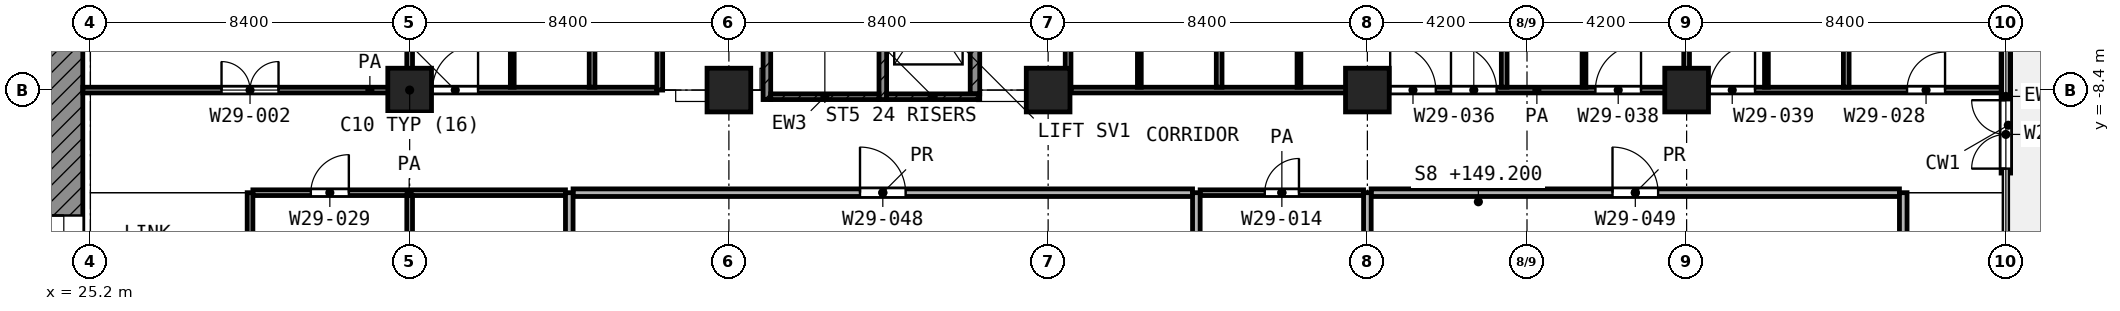
"""IFC4 building model, lengths in metres.
Left out: names, types, materials, properties, quantities, classifications, styles, units other than length and angle.
Written with IfcOpenShell. Run it as: python <this file> out.ifc"""

import sys

from ifc_helpers import new_model, si_unit, direction, frame, frame_2d, origin, origin_2d, place, context, subcontext, project, spatial, rectangle, extrude, element, fill, save


model = new_model("IFC4")
c1 = context("Model", 3, precision=1e-05, world=origin(), true_north=direction((0.0, 1.0)))
c2 = subcontext(c1, "Body", "Model", "MODEL_VIEW")
j1 = project(units=[si_unit("LENGTHUNIT", "METRE"), si_unit("PLANEANGLEUNIT", "RADIAN")], contexts=[c1])
p1 = place(None, origin())
s1 = spatial("IfcSite", under=j1, at=p1, CompositionType="ELEMENT")
p2 = place(p1, origin())
s2 = spatial("IfcBuilding", under=s1, at=p2, CompositionType="ELEMENT")
p3 = place(p2, frame((0.0, 0.0, 149.2)))
s3 = spatial("IfcBuildingStorey", under=s2, at=p3, CompositionType="ELEMENT", Elevation=149.2)
for number, where, z_axis, x_axis in (
    (1, (33.6, -8.4, 0.0), (0.0, 0.0, 1.0), (1.0, 0.0, 0.0)),
    (2, (42.0, -8.4, 0.0), (0.0, 0.0, 1.0), (1.0, 0.0, 0.0)),
    (3, (50.4, -8.4, 0.0), (0.0, 0.0, 1.0), (1.0, 0.0, 0.0)),
    (4, (58.8, -8.4, 0.0), (0.0, 0.0, 1.0), (1.0, 0.0, 0.0)),
    (5, (67.2, -8.4, 0.0), (0.0, 0.0, 1.0), (1.0, 0.0, 0.0)),
):
    element("IfcColumn", number, at=place(p3, frame(where, z_axis=z_axis, x_axis=x_axis)), inside=s3, PredefinedType="COLUMN", context=c2, shape_type="SweptSolid", body=[
        extrude(rectangle(XDim=1.15, YDim=1.15, at=origin_2d()), origin(), (0.0, 0.0, 1.0), 4.2),
    ])
p4 = place(p3, frame((75.6, -10.583, 0.0), z_axis=(0.0, 0.0, 1.0), x_axis=(0.0, 1.0, 0.0)))
e6 = element("IfcWall", 6, at=p4, inside=s3, PredefinedType="SOLIDWALL", context=c2, shape_type="SweptSolid", body=[
    extrude(rectangle(XDim=4.033, YDim=0.25, at=frame_2d((2.017, 0.0))), origin(), (0.0, 0.0, 1.0), 3.58),
])
p5 = place(p4, frame((0.117, 0.0, 0.0)))
e7 = element("IfcOpeningElement", 7, at=p5, cuts=e6, PredefinedType="OPENING", context=c2, shape_type="SweptSolid", body=[
    extrude(rectangle(XDim=1.8, YDim=2.1, at=frame_2d((0.9, 1.05))), frame((0.0, 0.135, 0.0), z_axis=(0.0, -1.0, 0.0), x_axis=(1.0, 0.0, 0.0)), (0.0, 0.0, 1.0), 0.27),
])
p6 = place(p3, frame((24.5, -24.0, 0.0), z_axis=(0.0, 0.0, 1.0), x_axis=(0.0, 1.0, 0.0)))
e8 = element("IfcWall", 8, at=p6, inside=s3, PredefinedType="SHEAR", context=c2, shape_type="SweptSolid", body=[
    extrude(rectangle(XDim=18.6, YDim=1.0, at=frame_2d((9.3, 0.0))), origin(), (0.0, 0.0, 1.0), 3.7),
])
p7 = place(p6, frame((10.5, 0.0, 0.0)))
e9 = element("IfcOpeningElement", 9, at=p7, cuts=e8, PredefinedType="OPENING", context=c2, shape_type="SweptSolid", body=[
    extrude(rectangle(XDim=1.8, YDim=2.1, at=frame_2d((0.9, 1.05))), frame((0.0, 0.51, 0.0), z_axis=(0.0, -1.0, 0.0), x_axis=(1.0, 0.0, 0.0)), (0.0, 0.0, 1.0), 1.02),
])
p8 = place(p3, frame((43.0, -8.65, 0.0), z_axis=(0.0, 0.0, 1.0), x_axis=(0.0, 1.0, 0.0)))
e10 = element("IfcWall", 10, at=p8, inside=s3, PredefinedType="SHEAR", context=c2, shape_type="SweptSolid", body=[
    extrude(rectangle(XDim=8.35, YDim=0.2, at=frame_2d((4.175, 0.0))), origin(), (0.0, 0.0, 1.0), 3.7),
])
p9 = place(p8, frame((7.0, 0.0, 0.0)))
e11 = element("IfcOpeningElement", 11, at=p9, cuts=e10, PredefinedType="OPENING", context=c2, shape_type="SweptSolid", body=[
    extrude(rectangle(XDim=1.1, YDim=2.1, at=frame_2d((0.55, 1.05))), frame((0.0, 0.11, 0.0), z_axis=(0.0, -1.0, 0.0), x_axis=(1.0, 0.0, 0.0)), (0.0, 0.0, 1.0), 0.22),
])
p10 = place(p3, frame((46.05, -8.65, 0.0), z_axis=(0.0, 0.0, 1.0), x_axis=(0.0, 1.0, 0.0)))
e12 = element("IfcWall", 12, at=p10, inside=s3, PredefinedType="SHEAR", context=c2, shape_type="SweptSolid", body=[
    extrude(rectangle(XDim=8.35, YDim=0.2, at=frame_2d((4.175, 0.0))), origin(), (0.0, 0.0, 1.0), 3.7),
])
p11 = place(p10, frame((7.0, 0.0, 0.0)))
e13 = element("IfcOpeningElement", 13, at=p11, cuts=e12, PredefinedType="OPENING", context=c2, shape_type="SweptSolid", body=[
    extrude(rectangle(XDim=1.1, YDim=2.1, at=frame_2d((0.55, 1.05))), frame((0.0, 0.11, 0.0), z_axis=(0.0, -1.0, 0.0), x_axis=(1.0, 0.0, 0.0)), (0.0, 0.0, 1.0), 0.22),
])
p12 = place(p3, frame((43.1, -8.575, 0.0), z_axis=(0.0, 0.0, 1.0), x_axis=(1.0, 0.0, 0.0)))
e14 = element("IfcWall", 14, at=p12, inside=s3, PredefinedType="SHEAR", context=c2, shape_type="SweptSolid", body=[
    extrude(rectangle(XDim=2.85, YDim=0.15, at=frame_2d((1.425, 0.0))), origin(), (0.0, 0.0, 1.0), 3.7),
])
p13 = place(p3, frame((46.15, -8.575, 0.0), z_axis=(0.0, 0.0, 1.0), x_axis=(1.0, 0.0, 0.0)))
e15 = element("IfcWall", 15, at=p13, inside=s3, PredefinedType="SHEAR", context=c2, shape_type="SweptSolid", body=[
    extrude(rectangle(XDim=2.45, YDim=0.15, at=frame_2d((1.225, 0.0))), origin(), (0.0, 0.0, 1.0), 3.7),
])
p14 = place(p3, frame((48.475, -8.5, 0.0), z_axis=(0.0, 0.0, 1.0), x_axis=(0.0, 1.0, 0.0)))
e16 = element("IfcWall", 16, at=p14, inside=s3, PredefinedType="SHEAR", context=c2, shape_type="SweptSolid", body=[
    extrude(rectangle(XDim=3.475, YDim=0.25, at=frame_2d((1.738, 0.0))), origin(), (0.0, 0.0, 1.0), 3.7),
])
p15 = place(p3, frame((36.3, -8.325, 0.0), z_axis=(0.0, 0.0, 1.0), x_axis=(0.0, 1.0, 0.0)))
e17 = element("IfcWall", 17, at=p15, inside=s3, PredefinedType="PARTITIONING", context=c2, shape_type="SweptSolid", body=[
    extrude(rectangle(XDim=2.624, YDim=0.1, at=frame_2d((1.312, 0.0))), origin(), (0.0, 0.0, 1.0), 3.7),
])
p16 = place(p3, frame((52.8, -8.325, 0.0), z_axis=(0.0, 0.0, 1.0), x_axis=(0.0, 1.0, 0.0)))
e18 = element("IfcWall", 18, at=p16, inside=s3, PredefinedType="PARTITIONING", context=c2, shape_type="SweptSolid", body=[
    extrude(rectangle(XDim=2.625, YDim=0.1, at=frame_2d((1.312, 0.0))), origin(), (0.0, 0.0, 1.0), 3.7),
])
p17 = place(p3, frame((57.0, -8.325, 0.0), z_axis=(0.0, 0.0, 1.0), x_axis=(0.0, 1.0, 0.0)))
e19 = element("IfcWall", 19, at=p17, inside=s3, PredefinedType="PARTITIONING", context=c2, shape_type="SweptSolid", body=[
    extrude(rectangle(XDim=2.624, YDim=0.1, at=frame_2d((1.312, 0.0))), origin(), (0.0, 0.0, 1.0), 3.7),
])
p18 = place(p3, frame((64.5, -8.325, 0.0), z_axis=(0.0, 0.0, 1.0), x_axis=(0.0, 1.0, 0.0)))
e20 = element("IfcWall", 20, at=p18, inside=s3, PredefinedType="PARTITIONING", context=c2, shape_type="SweptSolid", body=[
    extrude(rectangle(XDim=2.625, YDim=0.1, at=frame_2d((1.312, 0.0))), origin(), (0.0, 0.0, 1.0), 3.7),
])
p19 = place(p3, frame((69.3, -8.325, 0.0), z_axis=(0.0, 0.0, 1.0), x_axis=(0.0, 1.0, 0.0)))
e21 = element("IfcWall", 21, at=p19, inside=s3, PredefinedType="PARTITIONING", context=c2, shape_type="SweptSolid", body=[
    extrude(rectangle(XDim=2.624, YDim=0.1, at=frame_2d((1.312, 0.0))), origin(), (0.0, 0.0, 1.0), 3.7),
])
p20 = place(p3, frame((29.475, -11.1, 0.0), z_axis=(0.0, 0.0, 1.0), x_axis=(1.0, 0.0, 0.0)))
e22 = element("IfcWall", 22, at=p20, inside=s3, PredefinedType="PARTITIONING", context=c2, shape_type="SweptSolid", body=[
    extrude(rectangle(XDim=8.225, YDim=0.15, at=frame_2d((4.112, 0.0))), origin(), (0.0, 0.0, 1.0), 3.7),
])
p21 = place(p20, frame((1.525, 0.0, 0.0)))
e23 = element("IfcOpeningElement", 23, at=p21, cuts=e22, PredefinedType="OPENING", context=c2, shape_type="SweptSolid", body=[
    extrude(rectangle(XDim=1.0, YDim=2.1, at=frame_2d((0.5, 1.05))), frame((0.0, 0.085, 0.0), z_axis=(0.0, -1.0, 0.0), x_axis=(1.0, 0.0, 0.0)), (0.0, 0.0, 1.0), 0.17),
])
p22 = place(p3, frame((54.4, -11.1, 0.0), z_axis=(0.0, 0.0, 1.0), x_axis=(1.0, 0.0, 0.0)))
e24 = element("IfcWall", 24, at=p22, inside=s3, PredefinedType="PARTITIONING", context=c2, shape_type="SweptSolid", body=[
    extrude(rectangle(XDim=4.3, YDim=0.15, at=frame_2d((2.15, 0.0))), origin(), (0.0, 0.0, 1.0), 3.7),
])
p23 = place(p22, frame((1.7, 0.0, 0.0)))
e25 = element("IfcOpeningElement", 25, at=p23, cuts=e24, PredefinedType="OPENING", context=c2, shape_type="SweptSolid", body=[
    extrude(rectangle(XDim=0.9, YDim=2.1, at=frame_2d((0.45, 1.05))), frame((0.0, 0.085, 0.0), z_axis=(0.0, -1.0, 0.0), x_axis=(1.0, 0.0, 0.0)), (0.0, 0.0, 1.0), 0.17),
])
p24 = place(p3, frame((25.0, -8.4, 0.0), z_axis=(0.0, 0.0, 1.0), x_axis=(1.0, 0.0, 0.0)))
e26 = element("IfcWall", 26, at=p24, inside=s3, PredefinedType="PARTITIONING", context=c2, shape_type="SweptSolid", body=[
    extrude(rectangle(XDim=15.107, YDim=0.15, at=frame_2d((7.553, 0.0))), origin(), (0.0, 0.0, 1.0), 3.7),
])
p25 = place(p24, frame((3.65, 0.0, 0.0)))
e27 = element("IfcOpeningElement", 27, at=p25, cuts=e26, PredefinedType="OPENING", context=c2, shape_type="SweptSolid", body=[
    extrude(rectangle(XDim=1.5, YDim=2.1, at=frame_2d((0.75, 1.05))), frame((0.0, 0.085, 0.0), z_axis=(0.0, -1.0, 0.0), x_axis=(1.0, 0.0, 0.0)), (0.0, 0.0, 1.0), 0.17),
])
p26 = place(p24, frame((9.2, 0.0, 0.0)))
e28 = element("IfcOpeningElement", 28, at=p26, cuts=e26, PredefinedType="OPENING", context=c2, shape_type="SweptSolid", body=[
    extrude(rectangle(XDim=1.2, YDim=2.1, at=frame_2d((0.6, 1.05))), frame((0.0, 0.085, 0.0), z_axis=(0.0, -1.0, 0.0), x_axis=(1.0, 0.0, 0.0)), (0.0, 0.0, 1.0), 0.17),
])
p27 = place(p3, frame((51.0, -8.4, 0.0), z_axis=(0.0, 0.0, 1.0), x_axis=(1.0, 0.0, 0.0)))
e29 = element("IfcWall", 29, at=p27, inside=s3, PredefinedType="PARTITIONING", context=c2, shape_type="SweptSolid", body=[
    extrude(rectangle(XDim=24.52, YDim=0.15, at=frame_2d((12.26, 0.0))), origin(), (0.0, 0.0, 1.0), 3.7),
])
p28 = place(p27, frame((8.4, 0.0, 0.0)))
e30 = element("IfcOpeningElement", 30, at=p28, cuts=e29, PredefinedType="OPENING", context=c2, shape_type="SweptSolid", body=[
    extrude(rectangle(XDim=1.2, YDim=2.1, at=frame_2d((0.6, 1.05))), frame((0.0, 0.085, 0.0), z_axis=(0.0, -1.0, 0.0), x_axis=(1.0, 0.0, 0.0)), (0.0, 0.0, 1.0), 0.17),
])
p29 = place(p27, frame((10.0, 0.0, 0.0)))
e31 = element("IfcOpeningElement", 31, at=p29, cuts=e29, PredefinedType="OPENING", context=c2, shape_type="SweptSolid", body=[
    extrude(rectangle(XDim=1.2, YDim=2.1, at=frame_2d((0.6, 1.05))), frame((0.0, 0.085, 0.0), z_axis=(0.0, -1.0, 0.0), x_axis=(1.0, 0.0, 0.0)), (0.0, 0.0, 1.0), 0.17),
])
p30 = place(p27, frame((13.8, 0.0, 0.0)))
e32 = element("IfcOpeningElement", 32, at=p30, cuts=e29, PredefinedType="OPENING", context=c2, shape_type="SweptSolid", body=[
    extrude(rectangle(XDim=1.2, YDim=2.1, at=frame_2d((0.6, 1.05))), frame((0.0, 0.085, 0.0), z_axis=(0.0, -1.0, 0.0), x_axis=(1.0, 0.0, 0.0)), (0.0, 0.0, 1.0), 0.17),
])
p31 = place(p27, frame((16.8, 0.0, 0.0)))
e33 = element("IfcOpeningElement", 33, at=p31, cuts=e29, PredefinedType="OPENING", context=c2, shape_type="SweptSolid", body=[
    extrude(rectangle(XDim=1.2, YDim=2.1, at=frame_2d((0.6, 1.05))), frame((0.0, 0.085, 0.0), z_axis=(0.0, -1.0, 0.0), x_axis=(1.0, 0.0, 0.0)), (0.0, 0.0, 1.0), 0.17),
])
p32 = place(p27, frame((22.0, 0.0, 0.0)))
e34 = element("IfcOpeningElement", 34, at=p32, cuts=e29, PredefinedType="OPENING", context=c2, shape_type="SweptSolid", body=[
    extrude(rectangle(XDim=1.0, YDim=2.1, at=frame_2d((0.5, 1.05))), frame((0.0, 0.085, 0.0), z_axis=(0.0, -1.0, 0.0), x_axis=(1.0, 0.0, 0.0)), (0.0, 0.0, 1.0), 0.17),
])
p33 = place(p3, frame((29.4, -14.1, 0.0), z_axis=(0.0, 0.0, 1.0), x_axis=(0.0, 1.0, 0.0)))
e35 = element("IfcWall", 35, at=p33, inside=s3, PredefinedType="PARTITIONING", context=c2, shape_type="SweptSolid", body=[
    extrude(rectangle(XDim=3.0, YDim=0.15, at=frame_2d((1.5, 0.0))), origin(), (0.0, 0.0, 1.0), 3.7),
])
p34 = place(p3, frame((33.6, -14.025, 0.0), z_axis=(0.0, 0.0, 1.0), x_axis=(0.0, 1.0, 0.0)))
e36 = element("IfcWall", 36, at=p34, inside=s3, PredefinedType="PARTITIONING", context=c2, shape_type="SweptSolid", body=[
    extrude(rectangle(XDim=2.85, YDim=0.15, at=frame_2d((1.425, 0.0))), origin(), (0.0, 0.0, 1.0), 3.7),
])
for number, where, z_axis, x_axis in (
    (37, (33.6, -8.325, 0.0), (0.0, 0.0, 1.0), (0.0, 1.0, 0.0)),
    (38, (38.4, -8.325, 0.0), (0.0, 0.0, 1.0), (0.0, 1.0, 0.0)),
):
    element("IfcWall", number, at=place(p3, frame(where, z_axis=z_axis, x_axis=x_axis)), inside=s3, PredefinedType="PARTITIONING", context=c2, shape_type="SweptSolid", body=[
        extrude(rectangle(XDim=8.322, YDim=0.15, at=frame_2d((4.161, 0.0))), origin(), (0.0, 0.0, 1.0), 3.7),
    ])
p35 = place(p3, frame((40.182, -8.4, 0.0), z_axis=(0.0, 0.0, 1.0), x_axis=(0.0, 1.0, 0.0)))
e39 = element("IfcWall", 39, at=p35, inside=s3, PredefinedType="PARTITIONING", context=c2, shape_type="SweptSolid", body=[
    extrude(rectangle(XDim=8.05, YDim=0.15, at=frame_2d((4.025, 0.0))), origin(), (0.0, 0.0, 1.0), 3.7),
])
p36 = place(p35, frame((3.525, 0.0, 0.0)))
e40 = element("IfcOpeningElement", 40, at=p36, cuts=e39, PredefinedType="OPENING", context=c2, shape_type="SweptSolid", body=[
    extrude(rectangle(XDim=1.0, YDim=2.1, at=frame_2d((0.5, 1.05))), frame((0.0, 0.085, 0.0), z_axis=(0.0, -1.0, 0.0), x_axis=(1.0, 0.0, 0.0)), (0.0, 0.0, 1.0), 0.17),
])
p37 = place(p3, frame((50.925, -8.4, 0.0), z_axis=(0.0, 0.0, 1.0), x_axis=(0.0, 1.0, 0.0)))
e41 = element("IfcWall", 41, at=p37, inside=s3, PredefinedType="PARTITIONING", context=c2, shape_type="SweptSolid", body=[
    extrude(rectangle(XDim=6.547, YDim=0.15, at=frame_2d((3.273, 0.0))), origin(), (0.0, 0.0, 1.0), 3.7),
])
p38 = place(p37, frame((3.765, 0.0, 0.0)))
e42 = element("IfcOpeningElement", 42, at=p38, cuts=e41, PredefinedType="OPENING", context=c2, shape_type="SweptSolid", body=[
    extrude(rectangle(XDim=1.2, YDim=2.1, at=frame_2d((0.6, 1.05))), frame((0.0, 0.085, 0.0), z_axis=(0.0, -1.0, 0.0), x_axis=(1.0, 0.0, 0.0)), (0.0, 0.0, 1.0), 0.17),
])
p39 = place(p37, frame((1.582, 0.0, 0.0)))
e43 = element("IfcOpeningElement", 43, at=p39, cuts=e41, PredefinedType="OPENING", context=c2, shape_type="SweptSolid", body=[
    extrude(rectangle(XDim=1.2, YDim=2.1, at=frame_2d((0.6, 1.05))), frame((0.0, 0.085, 0.0), z_axis=(0.0, -1.0, 0.0), x_axis=(1.0, 0.0, 0.0)), (0.0, 0.0, 1.0), 0.17),
])
p40 = place(p3, frame((54.9, -8.325, 0.0), z_axis=(0.0, 0.0, 1.0), x_axis=(0.0, 1.0, 0.0)))
e44 = element("IfcWall", 44, at=p40, inside=s3, PredefinedType="PARTITIONING", context=c2, shape_type="SweptSolid", body=[
    extrude(rectangle(XDim=8.323, YDim=0.15, at=frame_2d((4.162, 0.0))), origin(), (0.0, 0.0, 1.0), 3.7),
])
p41 = place(p3, frame((62.4, -8.325, 0.0), z_axis=(0.0, 0.0, 1.0), x_axis=(0.0, 1.0, 0.0)))
e45 = element("IfcWall", 45, at=p41, inside=s3, PredefinedType="PARTITIONING", context=c2, shape_type="SweptSolid", body=[
    extrude(rectangle(XDim=8.325, YDim=0.15, at=frame_2d((4.163, 0.0))), origin(), (0.0, 0.0, 1.0), 3.7),
])
for number, where, z_axis, x_axis in (
    (46, (67.2, -8.325, 0.0), (0.0, 0.0, 1.0), (0.0, 1.0, 0.0)),
    (47, (71.4, -8.325, 0.0), (0.0, 0.0, 1.0), (0.0, 1.0, 0.0)),
):
    element("IfcWall", number, at=place(p3, frame(where, z_axis=z_axis, x_axis=x_axis)), inside=s3, PredefinedType="PARTITIONING", context=c2, shape_type="SweptSolid", body=[
        extrude(rectangle(XDim=8.323, YDim=0.15, at=frame_2d((4.162, 0.0))), origin(), (0.0, 0.0, 1.0), 3.7),
    ])
p42 = place(p3, frame((37.9, -11.1, 0.0), z_axis=(0.0, 0.0, 1.0), x_axis=(1.0, 0.0, 0.0)))
e48 = element("IfcWall", 48, at=p42, inside=s3, PredefinedType="PARTITIONING", context=c2, shape_type="SweptSolid", body=[
    extrude(rectangle(XDim=16.3, YDim=0.2, at=frame_2d((8.15, 0.0))), origin(), (0.0, 0.0, 1.0), 3.7),
])
p43 = place(p42, frame((7.55, 0.0, 0.0)))
e49 = element("IfcOpeningElement", 49, at=p43, cuts=e48, PredefinedType="OPENING", context=c2, shape_type="SweptSolid", body=[
    extrude(rectangle(XDim=1.2, YDim=2.1, at=frame_2d((0.6, 1.05))), frame((0.0, 0.11, 0.0), z_axis=(0.0, -1.0, 0.0), x_axis=(1.0, 0.0, 0.0)), (0.0, 0.0, 1.0), 0.22),
])
p44 = place(p3, frame((58.9, -11.1, 0.0), z_axis=(0.0, 0.0, 1.0), x_axis=(1.0, 0.0, 0.0)))
e50 = element("IfcWall", 50, at=p44, inside=s3, PredefinedType="PARTITIONING", context=c2, shape_type="SweptSolid", body=[
    extrude(rectangle(XDim=13.9, YDim=0.2, at=frame_2d((6.95, 0.0))), origin(), (0.0, 0.0, 1.0), 3.7),
])
p45 = place(p44, frame((6.35, 0.0, 0.0)))
e51 = element("IfcOpeningElement", 51, at=p45, cuts=e50, PredefinedType="OPENING", context=c2, shape_type="SweptSolid", body=[
    extrude(rectangle(XDim=1.2, YDim=2.1, at=frame_2d((0.6, 1.05))), frame((0.0, 0.11, 0.0), z_axis=(0.0, -1.0, 0.0), x_axis=(1.0, 0.0, 0.0)), (0.0, 0.0, 1.0), 0.22),
])
for number, where, z_axis, x_axis in (
    (52, (37.8, -14.1, 0.0), (0.0, 0.0, 1.0), (0.0, 1.0, 0.0)),
    (53, (54.3, -14.1, 0.0), (0.0, 0.0, 1.0), (0.0, 1.0, 0.0)),
    (54, (58.8, -14.1, 0.0), (0.0, 0.0, 1.0), (0.0, 1.0, 0.0)),
    (55, (72.9, -14.1, 0.0), (0.0, 0.0, 1.0), (0.0, 1.0, 0.0)),
):
    element("IfcWall", number, at=place(p3, frame(where, z_axis=z_axis, x_axis=x_axis)), inside=s3, PredefinedType="PARTITIONING", context=c2, shape_type="SweptSolid", body=[
        extrude(rectangle(XDim=3.0, YDim=0.2, at=frame_2d((1.5, 0.0))), origin(), (0.0, 0.0, 1.0), 3.7),
    ])
p46 = place(p5, origin())
e56 = element("IfcDoor", 56, at=p46, inside=s3, OperationType="DOUBLE_DOOR_SINGLE_SWING", PredefinedType="DOOR", context=c2, shape_type="SweptSolid", body=[
    extrude(rectangle(XDim=1.8, YDim=2.1, at=frame_2d((0.9, 1.05))), frame((0.0, 0.025, 0.0), z_axis=(0.0, -1.0, 0.0), x_axis=(1.0, 0.0, 0.0)), (0.0, 0.0, 1.0), 0.05),
])
fill(e7, e56)
p47 = place(p7, origin())
e57 = element("IfcDoor", 57, at=p47, inside=s3, OperationType="DOUBLE_DOOR_SINGLE_SWING", PredefinedType="DOOR", context=c2, shape_type="SweptSolid", body=[
    extrude(rectangle(XDim=1.8, YDim=2.1, at=frame_2d((0.9, 1.05))), frame((0.0, 0.025, 0.0), z_axis=(0.0, -1.0, 0.0), x_axis=(1.0, 0.0, 0.0)), (0.0, 0.0, 1.0), 0.05),
])
fill(e9, e57)
p48 = place(p25, origin())
e58 = element("IfcDoor", 58, at=p48, inside=s3, OperationType="DOUBLE_DOOR_SINGLE_SWING", PredefinedType="DOOR", context=c2, shape_type="SweptSolid", body=[
    extrude(rectangle(XDim=1.5, YDim=2.1, at=frame_2d((0.75, 1.05))), frame((0.0, 0.025, 0.0), z_axis=(0.0, -1.0, 0.0), x_axis=(1.0, 0.0, 0.0)), (0.0, 0.0, 1.0), 0.05),
])
fill(e27, e58)
p49 = place(p26, origin())
e59 = element("IfcDoor", 59, at=p49, inside=s3, OperationType="SINGLE_SWING_RIGHT", PredefinedType="DOOR", context=c2, shape_type="SweptSolid", body=[
    extrude(rectangle(XDim=1.2, YDim=2.1, at=frame_2d((0.6, 1.05))), frame((0.0, 0.025, 0.0), z_axis=(0.0, -1.0, 0.0), x_axis=(1.0, 0.0, 0.0)), (0.0, 0.0, 1.0), 0.05),
])
fill(e28, e59)
p50 = place(p28, origin())
e60 = element("IfcDoor", 60, at=p50, inside=s3, OperationType="SINGLE_SWING_LEFT", PredefinedType="DOOR", context=c2, shape_type="SweptSolid", body=[
    extrude(rectangle(XDim=1.2, YDim=2.1, at=frame_2d((0.6, 1.05))), frame((0.0, 0.025, 0.0), z_axis=(0.0, -1.0, 0.0), x_axis=(1.0, 0.0, 0.0)), (0.0, 0.0, 1.0), 0.05),
])
fill(e30, e60)
p51 = place(p29, origin())
e61 = element("IfcDoor", 61, at=p51, inside=s3, OperationType="SINGLE_SWING_LEFT", PredefinedType="DOOR", context=c2, shape_type="SweptSolid", body=[
    extrude(rectangle(XDim=1.2, YDim=2.1, at=frame_2d((0.6, 1.05))), frame((0.0, 0.025, 0.0), z_axis=(0.0, -1.0, 0.0), x_axis=(1.0, 0.0, 0.0)), (0.0, 0.0, 1.0), 0.05),
])
fill(e31, e61)
p52 = place(p30, origin())
e62 = element("IfcDoor", 62, at=p52, inside=s3, OperationType="SINGLE_SWING_RIGHT", PredefinedType="DOOR", context=c2, shape_type="SweptSolid", body=[
    extrude(rectangle(XDim=1.2, YDim=2.1, at=frame_2d((0.6, 1.05))), frame((0.0, 0.025, 0.0), z_axis=(0.0, -1.0, 0.0), x_axis=(1.0, 0.0, 0.0)), (0.0, 0.0, 1.0), 0.05),
])
fill(e32, e62)
p53 = place(p31, origin())
e63 = element("IfcDoor", 63, at=p53, inside=s3, OperationType="SINGLE_SWING_RIGHT", PredefinedType="DOOR", context=c2, shape_type="SweptSolid", body=[
    extrude(rectangle(XDim=1.2, YDim=2.1, at=frame_2d((0.6, 1.05))), frame((0.0, 0.025, 0.0), z_axis=(0.0, -1.0, 0.0), x_axis=(1.0, 0.0, 0.0)), (0.0, 0.0, 1.0), 0.05),
])
fill(e33, e63)
p54 = place(p32, origin())
e64 = element("IfcDoor", 64, at=p54, inside=s3, OperationType="SINGLE_SWING_RIGHT", PredefinedType="DOOR", context=c2, shape_type="SweptSolid", body=[
    extrude(rectangle(XDim=1.0, YDim=2.1, at=frame_2d((0.5, 1.05))), frame((0.0, 0.025, 0.0), z_axis=(0.0, -1.0, 0.0), x_axis=(1.0, 0.0, 0.0)), (0.0, 0.0, 1.0), 0.05),
])
fill(e34, e64)
p55 = place(p21, origin())
e65 = element("IfcDoor", 65, at=p55, inside=s3, OperationType="SINGLE_SWING_RIGHT", PredefinedType="DOOR", context=c2, shape_type="SweptSolid", body=[
    extrude(rectangle(XDim=1.0, YDim=2.1, at=frame_2d((0.5, 1.05))), frame((0.0, 0.025, 0.0), z_axis=(0.0, -1.0, 0.0), x_axis=(1.0, 0.0, 0.0)), (0.0, 0.0, 1.0), 0.05),
])
fill(e23, e65)
p56 = place(p43, origin())
e66 = element("IfcDoor", 66, at=p56, inside=s3, OperationType="SINGLE_SWING_LEFT", PredefinedType="DOOR", context=c2, shape_type="SweptSolid", body=[
    extrude(rectangle(XDim=1.2, YDim=2.1, at=frame_2d((0.6, 1.05))), frame((0.0, 0.025, 0.0), z_axis=(0.0, -1.0, 0.0), x_axis=(1.0, 0.0, 0.0)), (0.0, 0.0, 1.0), 0.05),
])
fill(e49, e66)
p57 = place(p23, origin())
e67 = element("IfcDoor", 67, at=p57, inside=s3, OperationType="SINGLE_SWING_RIGHT", PredefinedType="DOOR", context=c2, shape_type="SweptSolid", body=[
    extrude(rectangle(XDim=0.9, YDim=2.1, at=frame_2d((0.45, 1.05))), frame((0.0, 0.025, 0.0), z_axis=(0.0, -1.0, 0.0), x_axis=(1.0, 0.0, 0.0)), (0.0, 0.0, 1.0), 0.05),
])
fill(e25, e67)
p58 = place(p45, origin())
e68 = element("IfcDoor", 68, at=p58, inside=s3, OperationType="SINGLE_SWING_LEFT", PredefinedType="DOOR", context=c2, shape_type="SweptSolid", body=[
    extrude(rectangle(XDim=1.2, YDim=2.1, at=frame_2d((0.6, 1.05))), frame((0.0, 0.025, 0.0), z_axis=(0.0, -1.0, 0.0), x_axis=(1.0, 0.0, 0.0)), (0.0, 0.0, 1.0), 0.05),
])
fill(e51, e68)
save(model, sys.argv[1])
